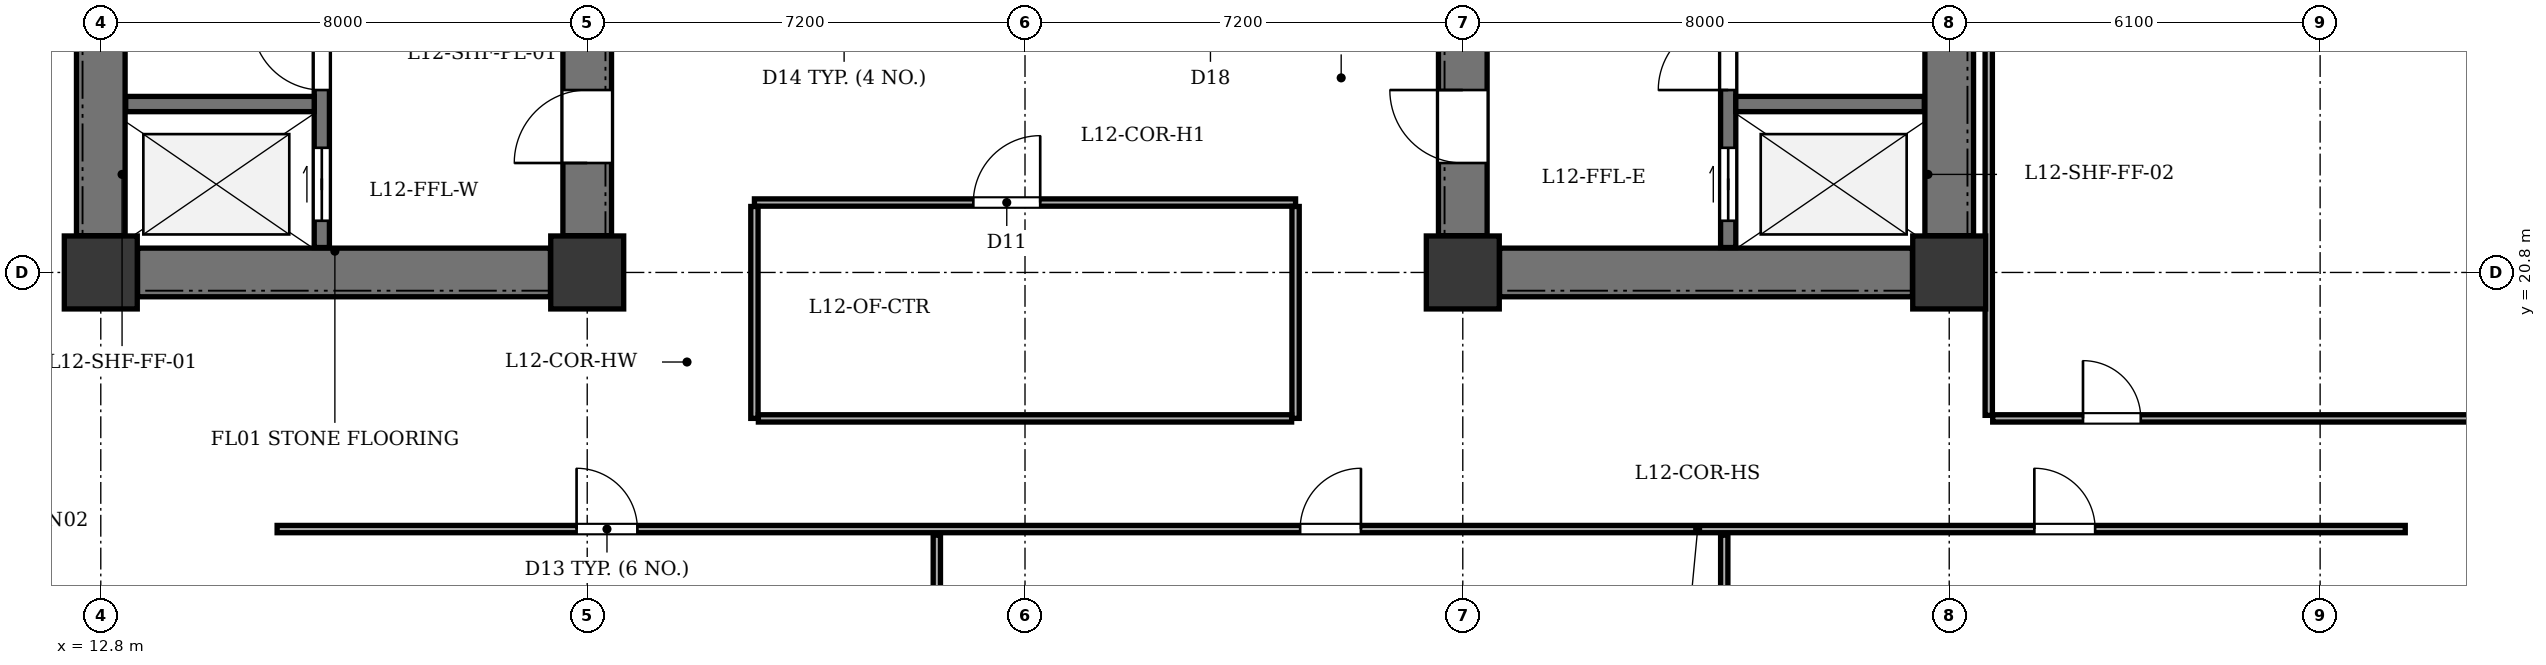
"""IFC4 building model, lengths in metres.
Left out: names, types, materials, properties, quantities, classifications, styles, units other than length and angle.
Written with IfcOpenShell. Run it as: python <this file> out.ifc"""

import sys

from ifc_helpers import new_model, si_unit, direction, frame, frame_2d, origin, origin_2d, place, context, subcontext, project, spatial, rectangle, extrude, element, fill, save


model = new_model("IFC4")
c1 = context("Model", 3, precision=1e-05, world=origin(), true_north=direction((0.0, 1.0)))
c2 = subcontext(c1, "Body", "Model", "MODEL_VIEW")
j1 = project(units=[si_unit("LENGTHUNIT", "METRE"), si_unit("PLANEANGLEUNIT", "RADIAN")], contexts=[c1])
p1 = place(None, origin())
s1 = spatial("IfcSite", under=j1, at=p1, CompositionType="ELEMENT")
p2 = place(p1, origin())
s2 = spatial("IfcBuilding", under=s1, at=p2, CompositionType="ELEMENT")
p3 = place(p2, frame((0.0, 0.0, 51.6)))
s3 = spatial("IfcBuildingStorey", under=s2, at=p3, CompositionType="ELEMENT", Elevation=51.6)
for number, where, z_axis, x_axis in (
    (1, (12.8, 20.8, 0.0), (0.0, 0.0, 1.0), (1.0, 0.0, 0.0)),
    (2, (20.8, 20.8, 0.0), (0.0, 0.0, 1.0), (1.0, 0.0, 0.0)),
    (3, (35.2, 20.8, 0.0), (0.0, 0.0, 1.0), (1.0, 0.0, 0.0)),
    (4, (43.2, 20.8, 0.0), (0.0, 0.0, 1.0), (1.0, 0.0, 0.0)),
):
    element("IfcColumn", number, at=place(p3, frame(where, z_axis=z_axis, x_axis=x_axis)), inside=s3, PredefinedType="COLUMN", context=c2, shape_type="SweptSolid", body=[
        extrude(rectangle(XDim=1.2, YDim=1.2, at=origin_2d()), origin(), (0.0, 0.0, 1.0), 3.9),
    ])
p4 = place(p3, frame((12.8, 21.405, 0.0), z_axis=(0.0, 0.0, 1.0), x_axis=(0.0, 1.0, 0.0)))
e5 = element("IfcWall", 5, at=p4, inside=s3, PredefinedType="SHEAR", context=c2, shape_type="SweptSolid", body=[
    extrude(rectangle(XDim=11.59, YDim=0.8, at=frame_2d((5.795, 0.0))), origin(), (0.0, 0.0, 1.0), 3.6),
])
p5 = place(p3, frame((13.405, 20.8, 0.0), z_axis=(0.0, 0.0, 1.0), x_axis=(1.0, 0.0, 0.0)))
e6 = element("IfcWall", 6, at=p5, inside=s3, PredefinedType="SHEAR", context=c2, shape_type="SweptSolid", body=[
    extrude(rectangle(XDim=6.79, YDim=0.8, at=frame_2d((3.395, 0.0))), origin(), (0.0, 0.0, 1.0), 3.6),
])
p6 = place(p3, frame((20.8, 21.405, 0.0), z_axis=(0.0, 0.0, 1.0), x_axis=(0.0, 1.0, 0.0)))
e7 = element("IfcWall", 7, at=p6, inside=s3, PredefinedType="SHEAR", context=c2, shape_type="SweptSolid", body=[
    extrude(rectangle(XDim=11.59, YDim=0.8, at=frame_2d((5.795, 0.0))), origin(), (0.0, 0.0, 1.0), 3.6),
])
p7 = place(p6, frame((1.195, 0.0, 0.0)))
e8 = element("IfcOpeningElement", 8, at=p7, cuts=e7, PredefinedType="OPENING", context=c2, shape_type="SweptSolid", body=[
    extrude(rectangle(XDim=1.2, YDim=2.15, at=frame_2d((0.6, 1.075))), frame((0.0, 0.41, 0.0), z_axis=(0.0, -1.0, 0.0), x_axis=(1.0, 0.0, 0.0)), (0.0, 0.0, 1.0), 0.82),
])
p8 = place(p6, frame((4.195, 0.0, 0.0)))
e9 = element("IfcOpeningElement", 9, at=p8, cuts=e7, PredefinedType="OPENING", context=c2, shape_type="SweptSolid", body=[
    extrude(rectangle(XDim=1.1, YDim=2.1, at=frame_2d((0.55, 1.05))), frame((0.0, 0.41, 0.0), z_axis=(0.0, -1.0, 0.0), x_axis=(1.0, 0.0, 0.0)), (0.0, 0.0, 1.0), 0.82),
])
p9 = place(p6, frame((6.145, 0.0, 0.0)))
e10 = element("IfcOpeningElement", 10, at=p9, cuts=e7, PredefinedType="OPENING", context=c2, shape_type="SweptSolid", body=[
    extrude(rectangle(XDim=1.1, YDim=2.1, at=frame_2d((0.55, 1.05))), frame((0.0, 0.41, 0.0), z_axis=(0.0, -1.0, 0.0), x_axis=(1.0, 0.0, 0.0)), (0.0, 0.0, 1.0), 0.82),
])
p10 = place(p6, frame((8.095, 0.0, 0.0)))
e11 = element("IfcOpeningElement", 11, at=p10, cuts=e7, PredefinedType="OPENING", context=c2, shape_type="SweptSolid", body=[
    extrude(rectangle(XDim=1.1, YDim=2.1, at=frame_2d((0.55, 1.05))), frame((0.0, 0.41, 0.0), z_axis=(0.0, -1.0, 0.0), x_axis=(1.0, 0.0, 0.0)), (0.0, 0.0, 1.0), 0.82),
])
p11 = place(p3, frame((16.435, 21.21, 0.0), z_axis=(0.0, 0.0, 1.0), x_axis=(0.0, 1.0, 0.0)))
e12 = element("IfcWall", 12, at=p11, inside=s3, PredefinedType="SHEAR", context=c2, shape_type="SweptSolid", body=[
    extrude(rectangle(XDim=11.98, YDim=0.25, at=frame_2d((5.99, 0.0))), origin(), (0.0, 0.0, 1.0), 3.6),
])
p12 = place(p11, frame((0.44, 0.0, 0.0)))
e13 = element("IfcOpeningElement", 13, at=p12, cuts=e12, PredefinedType="OPENING", context=c2, shape_type="SweptSolid", body=[
    extrude(rectangle(XDim=1.2, YDim=2.15, at=frame_2d((0.6, 1.075))), frame((0.0, 0.135, 0.0), z_axis=(0.0, -1.0, 0.0), x_axis=(1.0, 0.0, 0.0)), (0.0, 0.0, 1.0), 0.27),
])
p13 = place(p11, frame((2.59, 0.0, 0.0)))
e14 = element("IfcOpeningElement", 14, at=p13, cuts=e12, PredefinedType="OPENING", context=c2, shape_type="SweptSolid", body=[
    extrude(rectangle(XDim=1.15, YDim=2.15, at=frame_2d((0.575, 1.075))), frame((0.0, 0.135, 0.0), z_axis=(0.0, -1.0, 0.0), x_axis=(1.0, 0.0, 0.0)), (0.0, 0.0, 1.0), 0.27),
])
p14 = place(p3, frame((13.21, 23.57, 0.0), z_axis=(0.0, 0.0, 1.0), x_axis=(1.0, 0.0, 0.0)))
e15 = element("IfcWall", 15, at=p14, inside=s3, PredefinedType="SHEAR", context=c2, shape_type="SweptSolid", body=[
    extrude(rectangle(XDim=3.1, YDim=0.25, at=frame_2d((1.55, 0.0))), origin(), (0.0, 0.0, 1.0), 3.6),
])
p15 = place(p3, frame((43.2, 21.405, 0.0), z_axis=(0.0, 0.0, 1.0), x_axis=(0.0, 1.0, 0.0)))
e16 = element("IfcWall", 16, at=p15, inside=s3, PredefinedType="SHEAR", context=c2, shape_type="SweptSolid", body=[
    extrude(rectangle(XDim=11.59, YDim=0.8, at=frame_2d((5.795, 0.0))), origin(), (0.0, 0.0, 1.0), 3.6),
])
p16 = place(p3, frame((35.805, 20.8, 0.0), z_axis=(0.0, 0.0, 1.0), x_axis=(1.0, 0.0, 0.0)))
e17 = element("IfcWall", 17, at=p16, inside=s3, PredefinedType="SHEAR", context=c2, shape_type="SweptSolid", body=[
    extrude(rectangle(XDim=6.79, YDim=0.8, at=frame_2d((3.395, 0.0))), origin(), (0.0, 0.0, 1.0), 3.6),
])
p17 = place(p3, frame((35.2, 21.405, 0.0), z_axis=(0.0, 0.0, 1.0), x_axis=(0.0, 1.0, 0.0)))
e18 = element("IfcWall", 18, at=p17, inside=s3, PredefinedType="SHEAR", context=c2, shape_type="SweptSolid", body=[
    extrude(rectangle(XDim=11.59, YDim=0.8, at=frame_2d((5.795, 0.0))), origin(), (0.0, 0.0, 1.0), 3.6),
])
p18 = place(p17, frame((1.195, 0.0, 0.0)))
e19 = element("IfcOpeningElement", 19, at=p18, cuts=e18, PredefinedType="OPENING", context=c2, shape_type="SweptSolid", body=[
    extrude(rectangle(XDim=1.2, YDim=2.15, at=frame_2d((0.6, 1.075))), frame((0.0, 0.41, 0.0), z_axis=(0.0, -1.0, 0.0), x_axis=(1.0, 0.0, 0.0)), (0.0, 0.0, 1.0), 0.82),
])
p19 = place(p3, frame((39.565, 21.21, 0.0), z_axis=(0.0, 0.0, 1.0), x_axis=(0.0, 1.0, 0.0)))
e20 = element("IfcWall", 20, at=p19, inside=s3, PredefinedType="SHEAR", context=c2, shape_type="SweptSolid", body=[
    extrude(rectangle(XDim=11.98, YDim=0.25, at=frame_2d((5.99, 0.0))), origin(), (0.0, 0.0, 1.0), 3.6),
])
p20 = place(p19, frame((0.44, 0.0, 0.0)))
e21 = element("IfcOpeningElement", 21, at=p20, cuts=e20, PredefinedType="OPENING", context=c2, shape_type="SweptSolid", body=[
    extrude(rectangle(XDim=1.2, YDim=2.15, at=frame_2d((0.6, 1.075))), frame((0.0, 0.135, 0.0), z_axis=(0.0, -1.0, 0.0), x_axis=(1.0, 0.0, 0.0)), (0.0, 0.0, 1.0), 0.27),
])
p21 = place(p19, frame((2.59, 0.0, 0.0)))
e22 = element("IfcOpeningElement", 22, at=p21, cuts=e20, PredefinedType="OPENING", context=c2, shape_type="SweptSolid", body=[
    extrude(rectangle(XDim=1.15, YDim=2.15, at=frame_2d((0.575, 1.075))), frame((0.0, 0.135, 0.0), z_axis=(0.0, -1.0, 0.0), x_axis=(1.0, 0.0, 0.0)), (0.0, 0.0, 1.0), 0.27),
])
p22 = place(p3, frame((39.69, 23.57, 0.0), z_axis=(0.0, 0.0, 1.0), x_axis=(1.0, 0.0, 0.0)))
e23 = element("IfcWall", 23, at=p22, inside=s3, PredefinedType="SHEAR", context=c2, shape_type="SweptSolid", body=[
    extrude(rectangle(XDim=3.1, YDim=0.25, at=frame_2d((1.55, 0.0))), origin(), (0.0, 0.0, 1.0), 3.6),
])
p23 = place(p3, frame((23.55, 21.95, 0.0), z_axis=(0.0, 0.0, 1.0), x_axis=(1.0, 0.0, 0.0)))
e24 = element("IfcWall", 24, at=p23, inside=s3, PredefinedType="PARTITIONING", context=c2, shape_type="SweptSolid", body=[
    extrude(rectangle(XDim=8.9, YDim=0.12, at=frame_2d((4.45, 0.0))), origin(), (0.0, 0.0, 1.0), 3.135),
])
p24 = place(p23, frame((3.6, 0.0, 0.0)))
e25 = element("IfcOpeningElement", 25, at=p24, cuts=e24, PredefinedType="OPENING", context=c2, shape_type="SweptSolid", body=[
    extrude(rectangle(XDim=1.1, YDim=2.15, at=frame_2d((0.55, 1.075))), frame((0.0, 0.07, 0.0), z_axis=(0.0, -1.0, 0.0), x_axis=(1.0, 0.0, 0.0)), (0.0, 0.0, 1.0), 0.14),
])
for number, where, z_axis, x_axis in (
    (26, (23.55, 18.4, 0.0), (0.0, 0.0, 1.0), (0.0, 1.0, 0.0)),
    (27, (32.45, 18.4, 0.0), (0.0, 0.0, 1.0), (0.0, 1.0, 0.0)),
):
    element("IfcWall", number, at=place(p3, frame(where, z_axis=z_axis, x_axis=x_axis)), inside=s3, PredefinedType="PARTITIONING", context=c2, shape_type="SweptSolid", body=[
        extrude(rectangle(XDim=3.485, YDim=0.12, at=frame_2d((1.743, 0.0))), origin(), (0.0, 0.0, 1.0), 3.6),
    ])
p25 = place(p3, frame((23.615, 18.4, 0.0), z_axis=(0.0, 0.0, 1.0), x_axis=(1.0, 0.0, 0.0)))
e28 = element("IfcWall", 28, at=p25, inside=s3, PredefinedType="PARTITIONING", context=c2, shape_type="SweptSolid", body=[
    extrude(rectangle(XDim=8.77, YDim=0.12, at=frame_2d((4.385, 0.0))), origin(), (0.0, 0.0, 1.0), 3.6),
])
p26 = place(p3, frame((15.7, 16.58, 0.0), z_axis=(0.0, 0.0, 1.0), x_axis=(1.0, 0.0, 0.0)))
e29 = element("IfcWall", 29, at=p26, inside=s3, PredefinedType="PARTITIONING", context=c2, shape_type="SweptSolid", body=[
    extrude(rectangle(XDim=35.0, YDim=0.12, at=frame_2d((17.5, 0.0))), origin(), (0.0, 0.0, 1.0), 3.6),
])
p27 = place(p26, frame((4.925, 0.0, 0.0)))
e30 = element("IfcOpeningElement", 30, at=p27, cuts=e29, PredefinedType="OPENING", context=c2, shape_type="SweptSolid", body=[
    extrude(rectangle(XDim=1.0, YDim=2.1, at=frame_2d((0.5, 1.05))), frame((0.0, 0.07, 0.0), z_axis=(0.0, -1.0, 0.0), x_axis=(1.0, 0.0, 0.0)), (0.0, 0.0, 1.0), 0.14),
])
p28 = place(p26, frame((16.825, 0.0, 0.0)))
e31 = element("IfcOpeningElement", 31, at=p28, cuts=e29, PredefinedType="OPENING", context=c2, shape_type="SweptSolid", body=[
    extrude(rectangle(XDim=1.0, YDim=2.1, at=frame_2d((0.5, 1.05))), frame((0.0, 0.07, 0.0), z_axis=(0.0, -1.0, 0.0), x_axis=(1.0, 0.0, 0.0)), (0.0, 0.0, 1.0), 0.14),
])
p29 = place(p26, frame((28.9, 0.0, 0.0)))
e32 = element("IfcOpeningElement", 32, at=p29, cuts=e29, PredefinedType="OPENING", context=c2, shape_type="SweptSolid", body=[
    extrude(rectangle(XDim=1.0, YDim=2.1, at=frame_2d((0.5, 1.05))), frame((0.0, 0.07, 0.0), z_axis=(0.0, -1.0, 0.0), x_axis=(1.0, 0.0, 0.0)), (0.0, 0.0, 1.0), 0.14),
])
for number, where, z_axis, x_axis in (
    (33, (26.55, 1.905, 0.0), (0.0, 0.0, 1.0), (0.0, 1.0, 0.0)),
    (34, (39.5, 1.905, 0.0), (0.0, 0.0, 1.0), (0.0, 1.0, 0.0)),
):
    element("IfcWall", number, at=place(p3, frame(where, z_axis=z_axis, x_axis=x_axis)), inside=s3, PredefinedType="PARTITIONING", context=c2, shape_type="SweptSolid", body=[
        extrude(rectangle(XDim=14.575, YDim=0.12, at=frame_2d((7.288, 0.0))), origin(), (0.0, 0.0, 1.0), 3.6),
    ])
p30 = place(p3, frame((43.85, 18.45, 0.0), z_axis=(0.0, 0.0, 1.0), x_axis=(0.0, 1.0, 0.0)))
e35 = element("IfcWall", 35, at=p30, inside=s3, PredefinedType="PARTITIONING", context=c2, shape_type="SweptSolid", body=[
    extrude(rectangle(XDim=17.5, YDim=0.12, at=frame_2d((8.75, 0.0))), origin(), (0.0, 0.0, 1.0), 3.6),
])
p31 = place(p3, frame((43.915, 18.4, 0.0), z_axis=(0.0, 0.0, 1.0), x_axis=(1.0, 0.0, 0.0)))
e36 = element("IfcWall", 36, at=p31, inside=s3, PredefinedType="PARTITIONING", context=c2, shape_type="SweptSolid", body=[
    extrude(rectangle(XDim=11.38, YDim=0.12, at=frame_2d((5.69, 0.0))), origin(), (0.0, 0.0, 1.0), 3.6),
])
p32 = place(p31, frame((1.485, 0.0, 0.0)))
e37 = element("IfcOpeningElement", 37, at=p32, cuts=e36, PredefinedType="OPENING", context=c2, shape_type="SweptSolid", body=[
    extrude(rectangle(XDim=0.95, YDim=2.1, at=frame_2d((0.475, 1.05))), frame((0.0, 0.07, 0.0), z_axis=(0.0, -1.0, 0.0), x_axis=(1.0, 0.0, 0.0)), (0.0, 0.0, 1.0), 0.14),
])
p33 = place(p7, origin())
e38 = element("IfcDoor", 38, at=p33, inside=s3, OperationType="SINGLE_SWING_LEFT", PredefinedType="DOOR", context=c2, shape_type="SweptSolid", body=[
    extrude(rectangle(XDim=1.2, YDim=2.15, at=frame_2d((0.6, 1.075))), frame((0.0, 0.025, 0.0), z_axis=(0.0, -1.0, 0.0), x_axis=(1.0, 0.0, 0.0)), (0.0, 0.0, 1.0), 0.05),
])
fill(e8, e38)
p34 = place(p12, origin())
e39 = element("IfcDoor", 39, at=p34, inside=s3, OperationType="DOUBLE_DOOR_SLIDING", PredefinedType="DOOR", context=c2, shape_type="SweptSolid", body=[
    extrude(rectangle(XDim=1.2, YDim=2.15, at=frame_2d((0.6, 1.075))), frame((0.0, 0.025, 0.0), z_axis=(0.0, -1.0, 0.0), x_axis=(1.0, 0.0, 0.0)), (0.0, 0.0, 1.0), 0.05),
])
fill(e13, e39)
p35 = place(p13, origin())
e40 = element("IfcDoor", 40, at=p35, inside=s3, OperationType="SINGLE_SWING_RIGHT", PredefinedType="DOOR", context=c2, shape_type="SweptSolid", body=[
    extrude(rectangle(XDim=1.15, YDim=2.15, at=frame_2d((0.575, 1.075))), frame((0.0, 0.025, 0.0), z_axis=(0.0, -1.0, 0.0), x_axis=(1.0, 0.0, 0.0)), (0.0, 0.0, 1.0), 0.05),
])
fill(e14, e40)
p36 = place(p18, origin())
e41 = element("IfcDoor", 41, at=p36, inside=s3, OperationType="SINGLE_SWING_RIGHT", PredefinedType="DOOR", context=c2, shape_type="SweptSolid", body=[
    extrude(rectangle(XDim=1.2, YDim=2.15, at=frame_2d((0.6, 1.075))), frame((0.0, 0.025, 0.0), z_axis=(0.0, -1.0, 0.0), x_axis=(1.0, 0.0, 0.0)), (0.0, 0.0, 1.0), 0.05),
])
fill(e19, e41)
p37 = place(p20, origin())
e42 = element("IfcDoor", 42, at=p37, inside=s3, OperationType="DOUBLE_DOOR_SLIDING", PredefinedType="DOOR", context=c2, shape_type="SweptSolid", body=[
    extrude(rectangle(XDim=1.2, YDim=2.15, at=frame_2d((0.6, 1.075))), frame((0.0, 0.025, 0.0), z_axis=(0.0, -1.0, 0.0), x_axis=(1.0, 0.0, 0.0)), (0.0, 0.0, 1.0), 0.05),
])
fill(e21, e42)
p38 = place(p21, origin())
e43 = element("IfcDoor", 43, at=p38, inside=s3, OperationType="SINGLE_SWING_LEFT", PredefinedType="DOOR", context=c2, shape_type="SweptSolid", body=[
    extrude(rectangle(XDim=1.15, YDim=2.15, at=frame_2d((0.575, 1.075))), frame((0.0, 0.025, 0.0), z_axis=(0.0, -1.0, 0.0), x_axis=(1.0, 0.0, 0.0)), (0.0, 0.0, 1.0), 0.05),
])
fill(e22, e43)
p39 = place(p24, origin())
e44 = element("IfcDoor", 44, at=p39, inside=s3, OperationType="SINGLE_SWING_RIGHT", PredefinedType="DOOR", context=c2, shape_type="SweptSolid", body=[
    extrude(rectangle(XDim=1.1, YDim=2.15, at=frame_2d((0.55, 1.075))), frame((0.0, 0.025, 0.0), z_axis=(0.0, -1.0, 0.0), x_axis=(1.0, 0.0, 0.0)), (0.0, 0.0, 1.0), 0.05),
])
fill(e25, e44)
p40 = place(p27, origin())
e45 = element("IfcDoor", 45, at=p40, inside=s3, OperationType="SINGLE_SWING_LEFT", PredefinedType="DOOR", context=c2, shape_type="SweptSolid", body=[
    extrude(rectangle(XDim=1.0, YDim=2.1, at=frame_2d((0.5, 1.05))), frame((0.0, 0.025, 0.0), z_axis=(0.0, -1.0, 0.0), x_axis=(1.0, 0.0, 0.0)), (0.0, 0.0, 1.0), 0.05),
])
fill(e30, e45)
p41 = place(p28, origin())
e46 = element("IfcDoor", 46, at=p41, inside=s3, OperationType="SINGLE_SWING_RIGHT", PredefinedType="DOOR", context=c2, shape_type="SweptSolid", body=[
    extrude(rectangle(XDim=1.0, YDim=2.1, at=frame_2d((0.5, 1.05))), frame((0.0, 0.025, 0.0), z_axis=(0.0, -1.0, 0.0), x_axis=(1.0, 0.0, 0.0)), (0.0, 0.0, 1.0), 0.05),
])
fill(e31, e46)
p42 = place(p29, origin())
e47 = element("IfcDoor", 47, at=p42, inside=s3, OperationType="SINGLE_SWING_LEFT", PredefinedType="DOOR", context=c2, shape_type="SweptSolid", body=[
    extrude(rectangle(XDim=1.0, YDim=2.1, at=frame_2d((0.5, 1.05))), frame((0.0, 0.025, 0.0), z_axis=(0.0, -1.0, 0.0), x_axis=(1.0, 0.0, 0.0)), (0.0, 0.0, 1.0), 0.05),
])
fill(e32, e47)
p43 = place(p32, origin())
e48 = element("IfcDoor", 48, at=p43, inside=s3, OperationType="SINGLE_SWING_LEFT", PredefinedType="DOOR", context=c2, shape_type="SweptSolid", body=[
    extrude(rectangle(XDim=0.95, YDim=2.1, at=frame_2d((0.475, 1.05))), frame((0.0, 0.025, 0.0), z_axis=(0.0, -1.0, 0.0), x_axis=(1.0, 0.0, 0.0)), (0.0, 0.0, 1.0), 0.05),
])
fill(e37, e48)
save(model, sys.argv[1])
